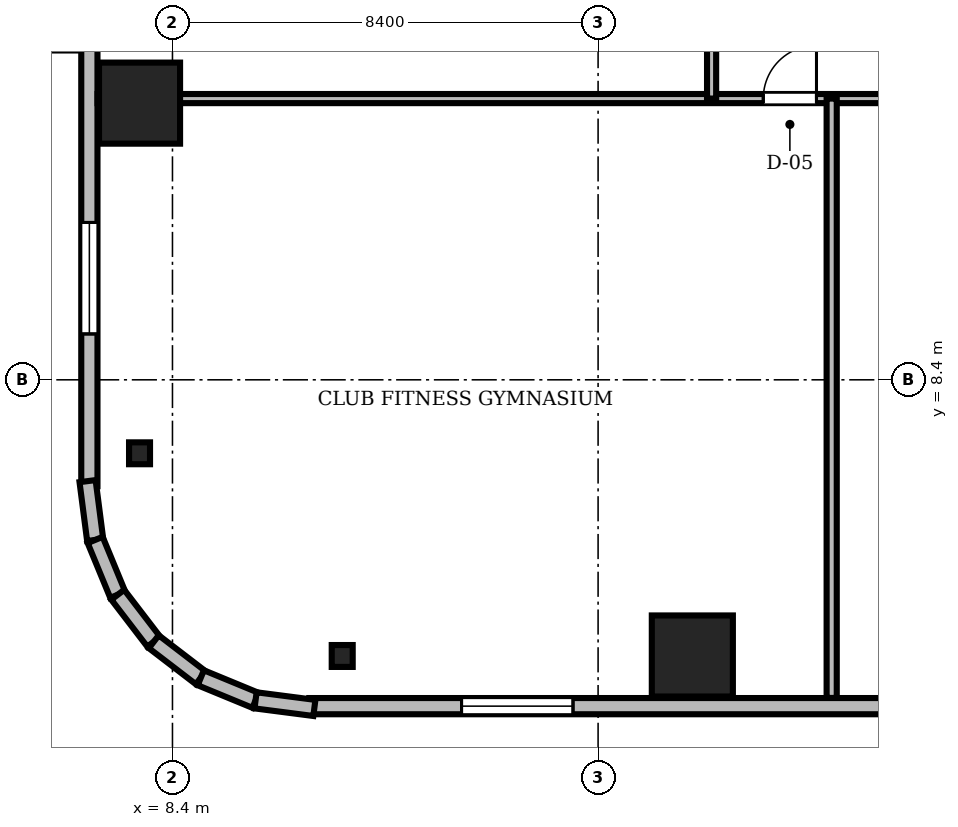
"""IFC4 building model, lengths in metres.
Left out: names, types, materials, properties, quantities, classifications, styles, units other than length and angle.
Written with IfcOpenShell. Run it as: python <this file> out.ifc"""

import sys

from ifc_helpers import new_model, si_unit, direction, frame, frame_2d, origin, origin_2d, place, context, subcontext, project, spatial, rectangle, i_section, extrude, source, transform, mapped, element, fill, save


model = new_model("IFC4")
c1 = context("Model", 3, precision=1e-05, world=origin(), true_north=direction((0.0, 1.0)))
c2 = subcontext(c1, "Body", "Model", "MODEL_VIEW")
j1 = project(units=[si_unit("LENGTHUNIT", "METRE"), si_unit("PLANEANGLEUNIT", "RADIAN")], contexts=[c1])
p1 = place(None, origin())
s1 = spatial("IfcSite", under=j1, at=p1, CompositionType="ELEMENT")
p2 = place(p1, origin())
s2 = spatial("IfcBuilding", under=s1, at=p2, CompositionType="ELEMENT")
p3 = place(p2, frame((0.0, 0.0, 115.0)))
s3 = spatial("IfcBuildingStorey", under=s2, at=p3, CompositionType="ELEMENT", Elevation=115.0)
m1 = source(origin(), c2, "Body", "SweptSolid", [
    extrude(rectangle(XDim=1.6, YDim=1.6, at=origin_2d()), origin(), (0.0, 0.0, 1.0), 3.46),
])
for number, where, z_axis, x_axis in (
    (1, (18.66, 2.95, 0.0), (0.0, 0.0, 1.0), (1.0, 0.0, 0.0)),
    (2, (7.75, 13.86, 0.0), (0.0, 0.0, 1.0), (1.0, 0.0, 0.0)),
):
    element("IfcColumn", number, at=place(p3, frame(where, z_axis=z_axis, x_axis=x_axis)), inside=s3, PredefinedType="COLUMN", context=c2, shape_type="MappedRepresentation", body=[
        mapped(m1, transform((0.0, 0.0, 0.0), scale=1.0)),
    ])
m2 = source(origin(), c2, "Body", "SweptSolid", [
    extrude(i_section(OverallWidth=0.414, OverallDepth=0.432, WebThickness=0.026, FlangeThickness=0.04, FilletRadius=0.015, at=origin_2d()), origin(), (0.0, 0.0, 1.0), 3.46),
])
for number, where, z_axis, x_axis in (
    (3, (11.75, 2.95, 0.0), (0.0, 0.0, 1.0), (1.0, 0.0, 0.0)),
    (4, (7.75, 6.95, 0.0), (0.0, 0.0, 1.0), (1.0, 0.0, 0.0)),
):
    element("IfcColumn", number, at=place(p3, frame(where, z_axis=z_axis, x_axis=x_axis)), inside=s3, PredefinedType="COLUMN", context=c2, shape_type="MappedRepresentation", body=[
        mapped(m2, transform((0.0, 0.0, 0.0), scale=1.0)),
    ])
m3 = source(origin(), c2, "Body", "SweptSolid", [
    extrude(rectangle(XDim=15.6, YDim=0.32, at=frame_2d((7.8, 0.0))), origin(), (0.0, 0.0, 1.0), 3.46),
])
p4 = place(p3, frame((11.1, 1.96, 0.0), z_axis=(0.0, 0.0, 1.0), x_axis=(1.0, 0.0, 0.0)))
e5 = element("IfcWall", 5, at=p4, inside=s3, PredefinedType="SOLIDWALL", context=c2, shape_type="MappedRepresentation", body=[
    mapped(m3, transform((0.0, 0.0, 0.0), scale=1.0)),
])
m4 = source(origin(), c2, "Body", "SweptSolid", [
    extrude(rectangle(XDim=2.2, YDim=2.4, at=frame_2d((1.1, 1.2))), frame((0.0, 0.17, 0.0), z_axis=(0.0, -1.0, 0.0), x_axis=(1.0, 0.0, 0.0)), (0.0, 0.0, 1.0), 0.34),
])
p5 = place(p4, frame((3.005, 0.0, 0.72)))
e6 = element("IfcOpeningElement", 6, at=p5, cuts=e5, PredefinedType="OPENING", context=c2, shape_type="MappedRepresentation", body=[
    mapped(m4, transform((0.0, 0.0, 0.0), scale=1.0)),
])
p6 = place(p3, frame((6.76, 21.9, 0.0), z_axis=(0.0, 0.0, 1.0), x_axis=(0.0, -1.0, 0.0)))
e7 = element("IfcWall", 7, at=p6, inside=s3, PredefinedType="SOLIDWALL", context=c2, shape_type="MappedRepresentation", body=[
    mapped(m3, transform((0.0, 0.0, 0.0), scale=1.0)),
])
m5 = source(origin(), c2, "Body", "SweptSolid", [
    extrude(rectangle(XDim=1.4, YDim=2.3, at=frame_2d((0.7, 1.15))), frame((0.0, 0.17, 0.0), z_axis=(0.0, -1.0, 0.0), x_axis=(1.0, 0.0, 0.0)), (0.0, 0.0, 1.0), 0.34),
])
p7 = place(p6, frame((4.59, 0.0, 0.0)))
e8 = element("IfcOpeningElement", 8, at=p7, cuts=e7, PredefinedType="OPENING", context=c2, shape_type="MappedRepresentation", body=[
    mapped(m5, transform((0.0, 0.0, 0.0), scale=1.0)),
])
p8 = place(p6, frame((10.395, 0.0, 0.72)))
e9 = element("IfcOpeningElement", 9, at=p8, cuts=e7, PredefinedType="OPENING", context=c2, shape_type="MappedRepresentation", body=[
    mapped(m4, transform((0.0, 0.0, 0.0), scale=1.0)),
])
m6 = source(origin(), c2, "Body", "SweptSolid", [
    extrude(rectangle(XDim=1.171, YDim=0.32, at=frame_2d((0.585, 0.0))), origin(), (0.0, 0.0, 1.0), 3.46),
])
p9 = place(p3, frame((6.724, 6.401, 0.0), z_axis=(0.0, 0.0, 1.0), x_axis=(0.128269133229, -0.991739395941, 0.0)))
e10 = element("IfcWall", 10, at=p9, inside=s3, PredefinedType="SOLIDWALL", context=c2, shape_type="MappedRepresentation", body=[
    mapped(m6, transform((0.0, 0.0, 0.0), scale=1.0)),
])
m7 = source(origin(), c2, "Body", "SweptSolid", [
    extrude(rectangle(XDim=1.169, YDim=0.32, at=frame_2d((0.584, 0.0))), origin(), (0.0, 0.0, 1.0), 3.46),
])
for number, where, z_axis, x_axis in (
    (11, (6.875, 5.24, 0.0), (0.0, 0.0, 1.0), (0.381, -0.925, 0.0)),
    (12, (7.32, 4.159, 0.0), (0.0, 0.0, 1.0), (0.608, -0.794, 0.0)),
):
    element("IfcWall", number, at=place(p3, frame(where, z_axis=z_axis, x_axis=x_axis)), inside=s3, PredefinedType="SOLIDWALL", context=c2, shape_type="MappedRepresentation", body=[
        mapped(m7, transform((0.0, 0.0, 0.0), scale=1.0)),
    ])
m8 = source(origin(), c2, "Body", "SweptSolid", [
    extrude(rectangle(XDim=1.169, YDim=0.32, at=frame_2d((0.584, 0.0))), origin(), (0.0, 0.0, 1.0), 3.46),
])
p10 = place(p3, frame((8.031, 3.231, 0.0), z_axis=(0.0, 0.0, 1.0), x_axis=(0.793663520347, -0.608356981114, 0.0)))
e13 = element("IfcWall", 13, at=p10, inside=s3, PredefinedType="SOLIDWALL", context=c2, shape_type="MappedRepresentation", body=[
    mapped(m8, transform((0.0, 0.0, 0.0), scale=1.0)),
])
m9 = source(origin(), c2, "Body", "SweptSolid", [
    extrude(rectangle(XDim=1.169, YDim=0.32, at=frame_2d((0.585, 0.0))), origin(), (0.0, 0.0, 1.0), 3.46),
])
p11 = place(p3, frame((8.959, 2.52, 0.0), z_axis=(0.0, 0.0, 1.0), x_axis=(0.924479075121, -0.381232789334, 0.0)))
e14 = element("IfcWall", 14, at=p11, inside=s3, PredefinedType="SOLIDWALL", context=c2, shape_type="MappedRepresentation", body=[
    mapped(m9, transform((0.0, 0.0, 0.0), scale=1.0)),
])
m10 = source(origin(), c2, "Body", "SweptSolid", [
    extrude(rectangle(XDim=1.17, YDim=0.32, at=frame_2d((0.585, 0.0))), origin(), (0.0, 0.0, 1.0), 3.46),
])
p12 = place(p3, frame((10.04, 2.074, 0.0), z_axis=(0.0, 0.0, 1.0), x_axis=(0.991762485493, -0.128090485085, 0.0)))
e15 = element("IfcWall", 15, at=p12, inside=s3, PredefinedType="SOLIDWALL", context=c2, shape_type="MappedRepresentation", body=[
    mapped(m10, transform((0.0, 0.0, 0.0), scale=1.0)),
])
m11 = source(origin(), c2, "Body", "SweptSolid", [
    extrude(rectangle(XDim=46.156, YDim=0.18, at=frame_2d((23.078, 0.0))), origin(), (0.0, 0.0, 1.0), 2.702),
])
p13 = place(p3, frame((6.922, 13.95, 0.0), z_axis=(0.0, 0.0, 1.0), x_axis=(1.0, 0.0, 0.0)))
e16 = element("IfcWall", 16, at=p13, inside=s3, PredefinedType="PARTITIONING", context=c2, shape_type="MappedRepresentation", body=[
    mapped(m11, transform((0.0, 0.0, 0.0), scale=1.0)),
])
m12 = source(origin(), c2, "Body", "SweptSolid", [
    extrude(rectangle(XDim=1.05, YDim=2.2, at=frame_2d((0.525, 1.1))), frame((0.0, 0.1, 0.0), z_axis=(0.0, -1.0, 0.0), x_axis=(1.0, 0.0, 0.0)), (0.0, 0.0, 1.0), 0.2),
])
p14 = place(p13, frame((13.138, 0.0, 0.0)))
e17 = element("IfcOpeningElement", 17, at=p14, cuts=e16, PredefinedType="OPENING", context=c2, shape_type="MappedRepresentation", body=[
    mapped(m12, transform((0.0, 0.0, 0.0), scale=1.0)),
])
p15 = place(p13, frame((17.705, 0.0, 0.0)))
e18 = element("IfcOpeningElement", 18, at=p15, cuts=e16, PredefinedType="OPENING", context=c2, shape_type="MappedRepresentation", body=[
    mapped(m12, transform((0.0, 0.0, 0.0), scale=1.0)),
])
p16 = place(p13, frame((25.178, 0.0, 0.0)))
e19 = element("IfcOpeningElement", 19, at=p16, cuts=e16, PredefinedType="OPENING", context=c2, shape_type="MappedRepresentation", body=[
    mapped(m12, transform((0.0, 0.0, 0.0), scale=1.0)),
])
p17 = place(p13, frame((32.651, 0.0, 0.0)))
e20 = element("IfcOpeningElement", 20, at=p17, cuts=e16, PredefinedType="OPENING", context=c2, shape_type="MappedRepresentation", body=[
    mapped(m12, transform((0.0, 0.0, 0.0), scale=1.0)),
])
p18 = place(p13, frame((40.998, 0.0, 0.0)))
e21 = element("IfcOpeningElement", 21, at=p18, cuts=e16, PredefinedType="OPENING", context=c2, shape_type="MappedRepresentation", body=[
    mapped(m12, transform((0.0, 0.0, 0.0), scale=1.0)),
])
m13 = source(origin(), c2, "Body", "SweptSolid", [
    extrude(rectangle(XDim=14.6, YDim=0.18, at=frame_2d((7.3, 0.0))), origin(), (0.0, 0.0, 1.0), 2.852),
])
p19 = place(p3, frame((19.04, 13.95, 0.0), z_axis=(0.0, 0.0, 1.0), x_axis=(0.0, 1.0, 0.0)))
e22 = element("IfcWall", 22, at=p19, inside=s3, PredefinedType="PARTITIONING", context=c2, shape_type="MappedRepresentation", body=[
    mapped(m13, transform((0.0, 0.0, 0.0), scale=1.0)),
])
p20 = place(p19, frame((1.888, 0.0, 0.0)))
e23 = element("IfcOpeningElement", 23, at=p20, cuts=e22, PredefinedType="OPENING", context=c2, shape_type="MappedRepresentation", body=[
    mapped(m12, transform((0.0, 0.0, 0.0), scale=1.0)),
])
m14 = source(origin(), c2, "Body", "SweptSolid", [
    extrude(rectangle(XDim=0.95, YDim=2.15, at=frame_2d((0.475, 1.075))), frame((0.0, 0.1, 0.0), z_axis=(0.0, -1.0, 0.0), x_axis=(1.0, 0.0, 0.0)), (0.0, 0.0, 1.0), 0.2),
])
p21 = place(p19, frame((7.93, 0.0, 0.0)))
e24 = element("IfcOpeningElement", 24, at=p21, cuts=e22, PredefinedType="OPENING", context=c2, shape_type="MappedRepresentation", body=[
    mapped(m14, transform((0.0, 0.0, 0.0), scale=1.0)),
])
p22 = place(p19, frame((11.522, 0.0, 0.0)))
e25 = element("IfcOpeningElement", 25, at=p22, cuts=e22, PredefinedType="OPENING", context=c2, shape_type="MappedRepresentation", body=[
    mapped(m12, transform((0.0, 0.0, 0.0), scale=1.0)),
])
m15 = source(origin(), c2, "Body", "SweptSolid", [
    extrude(rectangle(XDim=11.828, YDim=0.2, at=frame_2d((5.914, 0.0))), origin(), (0.0, 0.0, 1.0), 2.702),
])
p23 = place(p3, frame((21.41, 2.122, 0.0), z_axis=(0.0, 0.0, 1.0), x_axis=(0.0, 1.0, 0.0)))
e26 = element("IfcWall", 26, at=p23, inside=s3, PredefinedType="PARTITIONING", context=c2, shape_type="MappedRepresentation", body=[
    mapped(m15, transform((0.0, 0.0, 0.0), scale=1.0)),
])
m16 = source(origin(), c2, "Body", "SweptSolid", [
    extrude(rectangle(XDim=2.2, YDim=2.4, at=frame_2d((1.1, 1.2))), frame((0.0, 0.03, 0.0), z_axis=(0.0, -1.0, 0.0), x_axis=(1.0, 0.0, 0.0)), (0.0, 0.0, 1.0), 0.06),
])
p24 = place(p5, origin())
e27 = element("IfcWindow", 27, at=p24, inside=s3, PartitioningType="SINGLE_PANEL", PredefinedType="WINDOW", context=c2, shape_type="MappedRepresentation", body=[
    mapped(m16, transform((0.0, 0.0, 0.0), scale=1.0)),
])
fill(e6, e27)
p25 = place(p8, origin())
e28 = element("IfcWindow", 28, at=p25, inside=s3, PartitioningType="SINGLE_PANEL", PredefinedType="WINDOW", context=c2, shape_type="MappedRepresentation", body=[
    mapped(m16, transform((0.0, 0.0, 0.0), scale=1.0)),
])
fill(e9, e28)
m17 = source(origin(), c2, "Body", "SweptSolid", [
    extrude(rectangle(XDim=1.05, YDim=2.2, at=frame_2d((0.525, 1.1))), frame((0.0, 0.025, 0.0), z_axis=(0.0, -1.0, 0.0), x_axis=(1.0, 0.0, 0.0)), (0.0, 0.0, 1.0), 0.05),
])
p26 = place(p14, origin())
e29 = element("IfcDoor", 29, at=p26, inside=s3, OperationType="SINGLE_SWING_RIGHT", PredefinedType="DOOR", context=c2, shape_type="MappedRepresentation", body=[
    mapped(m17, transform((0.0, 0.0, 0.0), scale=1.0)),
])
fill(e17, e29)
save(model, sys.argv[1])
